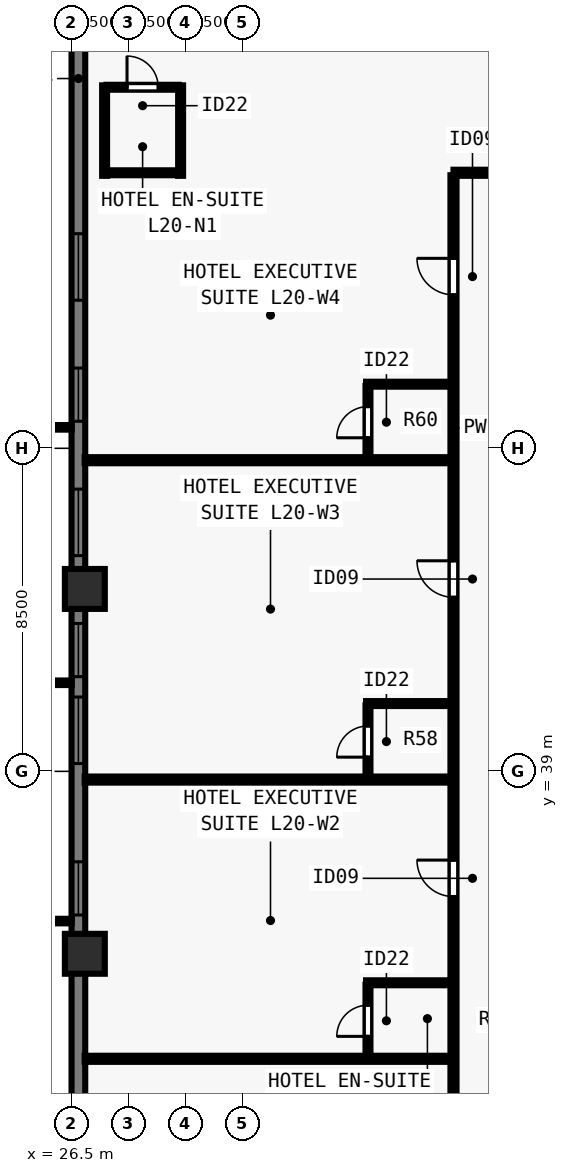
"""IFC4 building model, lengths in metres.
Left out: names, types, materials, properties, quantities, classifications, styles, units other than length and angle.
Written with IfcOpenShell. Run it as: python <this file> out.ifc"""

import sys

from ifc_helpers import new_model, si_unit, direction, frame, frame_2d, origin, origin_2d, place, context, subcontext, project, spatial, rectangle, extrude, element, fill, save


model = new_model("IFC4")
c1 = context("Model", 3, precision=1e-05, world=origin(), true_north=direction((0.0, 1.0)))
c2 = subcontext(c1, "Body", "Model", "MODEL_VIEW")
j1 = project(units=[si_unit("LENGTHUNIT", "METRE"), si_unit("PLANEANGLEUNIT", "RADIAN")], contexts=[c1])
p1 = place(None, origin())
s1 = spatial("IfcSite", under=j1, at=p1, CompositionType="ELEMENT")
p2 = place(p1, origin())
s2 = spatial("IfcBuilding", under=s1, at=p2, CompositionType="ELEMENT")
p3 = place(p2, frame((0.0, 0.0, 76.0)))
s3 = spatial("IfcBuildingStorey", under=s2, at=p3, CompositionType="ELEMENT", Elevation=76.0)
for number, where, z_axis, x_axis in (
    (1, (26.85, 43.8, 0.0), (0.0, 0.0, 1.0), (0.0, 1.0, 0.0)),
    (2, (26.85, 34.2, 0.0), (0.0, 0.0, 1.0), (0.0, 1.0, 0.0)),
):
    element("IfcColumn", number, at=place(p3, frame(where, z_axis=z_axis, x_axis=x_axis)), inside=s3, PredefinedType="COLUMN", context=c2, shape_type="SweptSolid", body=[
        extrude(rectangle(XDim=1.05, YDim=1.05, at=origin_2d()), origin(), (0.0, 0.0, 1.0), 3.5),
    ])
p4 = place(p3, frame((26.68, 16.5, 0.0), z_axis=(0.0, 0.0, 1.0), x_axis=(0.0, 1.0, 0.0)))
e3 = element("IfcWall", 3, at=p4, inside=s3, PredefinedType="SOLIDWALL", context=c2, shape_type="SweptSolid", body=[
    extrude(rectangle(XDim=44.662, YDim=0.36, at=frame_2d((22.331, 0.0))), origin(), (0.0, 0.0, 1.0), 3.28),
])
p5 = place(p4, frame((4.83, 0.0, 0.8)))
e4 = element("IfcOpeningElement", 4, at=p5, cuts=e3, PredefinedType="OPENING", context=c2, shape_type="SweptSolid", body=[
    extrude(rectangle(XDim=1.4, YDim=1.544, at=frame_2d((0.7, 0.772))), frame((0.0, 0.19, 0.0), z_axis=(0.0, -1.0, 0.0), x_axis=(1.0, 0.0, 0.0)), (0.0, 0.0, 1.0), 0.38),
])
p6 = place(p4, frame((8.015, 0.0, 0.8)))
e5 = element("IfcOpeningElement", 5, at=p6, cuts=e3, PredefinedType="OPENING", context=c2, shape_type="SweptSolid", body=[
    extrude(rectangle(XDim=1.75, YDim=1.544, at=frame_2d((0.875, 0.772))), frame((0.0, 0.19, 0.0), z_axis=(0.0, -1.0, 0.0), x_axis=(1.0, 0.0, 0.0)), (0.0, 0.0, 1.0), 0.38),
])
p7 = place(p4, frame((11.551, 0.0, 0.8)))
e6 = element("IfcOpeningElement", 6, at=p7, cuts=e3, PredefinedType="OPENING", context=c2, shape_type="SweptSolid", body=[
    extrude(rectangle(XDim=1.4, YDim=1.544, at=frame_2d((0.7, 0.772))), frame((0.0, 0.19, 0.0), z_axis=(0.0, -1.0, 0.0), x_axis=(1.0, 0.0, 0.0)), (0.0, 0.0, 1.0), 0.38),
])
p8 = place(p4, frame((18.721, 0.0, 0.8)))
e7 = element("IfcOpeningElement", 7, at=p8, cuts=e3, PredefinedType="OPENING", context=c2, shape_type="SweptSolid", body=[
    extrude(rectangle(XDim=1.4, YDim=1.544, at=frame_2d((0.7, 0.772))), frame((0.0, 0.19, 0.0), z_axis=(0.0, -1.0, 0.0), x_axis=(1.0, 0.0, 0.0)), (0.0, 0.0, 1.0), 0.38),
])
p9 = place(p4, frame((22.706, 0.0, 0.8)))
e8 = element("IfcOpeningElement", 8, at=p9, cuts=e3, PredefinedType="OPENING", context=c2, shape_type="SweptSolid", body=[
    extrude(rectangle(XDim=1.75, YDim=1.544, at=frame_2d((0.875, 0.772))), frame((0.0, 0.19, 0.0), z_axis=(0.0, -1.0, 0.0), x_axis=(1.0, 0.0, 0.0)), (0.0, 0.0, 1.0), 0.38),
])
p10 = place(p4, frame((24.991, 0.0, 0.8)))
e9 = element("IfcOpeningElement", 9, at=p10, cuts=e3, PredefinedType="OPENING", context=c2, shape_type="SweptSolid", body=[
    extrude(rectangle(XDim=1.4, YDim=1.544, at=frame_2d((0.7, 0.772))), frame((0.0, 0.19, 0.0), z_axis=(0.0, -1.0, 0.0), x_axis=(1.0, 0.0, 0.0)), (0.0, 0.0, 1.0), 0.38),
])
p11 = place(p4, frame((28.177, 0.0, 0.8)))
e10 = element("IfcOpeningElement", 10, at=p11, cuts=e3, PredefinedType="OPENING", context=c2, shape_type="SweptSolid", body=[
    extrude(rectangle(XDim=1.75, YDim=1.544, at=frame_2d((0.875, 0.772))), frame((0.0, 0.19, 0.0), z_axis=(0.0, -1.0, 0.0), x_axis=(1.0, 0.0, 0.0)), (0.0, 0.0, 1.0), 0.38),
])
p12 = place(p4, frame((31.711, 0.0, 0.8)))
e11 = element("IfcOpeningElement", 11, at=p12, cuts=e3, PredefinedType="OPENING", context=c2, shape_type="SweptSolid", body=[
    extrude(rectangle(XDim=1.4, YDim=1.544, at=frame_2d((0.7, 0.772))), frame((0.0, 0.19, 0.0), z_axis=(0.0, -1.0, 0.0), x_axis=(1.0, 0.0, 0.0)), (0.0, 0.0, 1.0), 0.38),
])
p13 = place(p4, frame((34.897, 0.0, 0.8)))
e12 = element("IfcOpeningElement", 12, at=p13, cuts=e3, PredefinedType="OPENING", context=c2, shape_type="SweptSolid", body=[
    extrude(rectangle(XDim=1.75, YDim=1.544, at=frame_2d((0.875, 0.772))), frame((0.0, 0.19, 0.0), z_axis=(0.0, -1.0, 0.0), x_axis=(1.0, 0.0, 0.0)), (0.0, 0.0, 1.0), 0.38),
])
p14 = place(p3, frame((36.55, 54.75, 0.0), z_axis=(0.0, 0.0, 1.0), x_axis=(1.0, 0.0, 0.0)))
e13 = element("IfcWall", 13, at=p14, inside=s3, PredefinedType="PARTITIONING", context=c2, shape_type="SweptSolid", body=[
    extrude(rectangle(XDim=30.9, YDim=0.16, at=frame_2d((15.45, 0.0))), origin(), (0.0, 0.0, 1.0), 3.28),
])
p15 = place(p14, frame((2.83, 0.0, 0.0)))
e14 = element("IfcOpeningElement", 14, at=p15, cuts=e13, PredefinedType="OPENING", context=c2, shape_type="SweptSolid", body=[
    extrude(rectangle(XDim=0.96, YDim=2.15, at=frame_2d((0.48, 1.075))), frame((0.0, 0.09, 0.0), z_axis=(0.0, -1.0, 0.0), x_axis=(1.0, 0.0, 0.0)), (0.0, 0.0, 1.0), 0.18),
])
p16 = place(p14, frame((15.965, 0.0, 0.0)))
e15 = element("IfcOpeningElement", 15, at=p16, cuts=e13, PredefinedType="OPENING", context=c2, shape_type="SweptSolid", body=[
    extrude(rectangle(XDim=0.96, YDim=2.15, at=frame_2d((0.48, 1.075))), frame((0.0, 0.09, 0.0), z_axis=(0.0, -1.0, 0.0), x_axis=(1.0, 0.0, 0.0)), (0.0, 0.0, 1.0), 0.18),
])
p17 = place(p14, frame((28.105, 0.0, 0.0)))
e16 = element("IfcOpeningElement", 16, at=p17, cuts=e13, PredefinedType="OPENING", context=c2, shape_type="SweptSolid", body=[
    extrude(rectangle(XDim=0.96, YDim=2.15, at=frame_2d((0.48, 1.075))), frame((0.0, 0.09, 0.0), z_axis=(0.0, -1.0, 0.0), x_axis=(1.0, 0.0, 0.0)), (0.0, 0.0, 1.0), 0.18),
])
p18 = place(p3, frame((36.55, 23.315, 0.0), z_axis=(0.0, 0.0, 1.0), x_axis=(0.0, 1.0, 0.0)))
e17 = element("IfcWall", 17, at=p18, inside=s3, PredefinedType="PARTITIONING", context=c2, shape_type="SweptSolid", body=[
    extrude(rectangle(XDim=31.37, YDim=0.16, at=frame_2d((15.685, 0.0))), origin(), (0.0, 0.0, 1.0), 3.28),
])
p19 = place(p18, frame((4.848, 0.0, 0.0)))
e18 = element("IfcOpeningElement", 18, at=p19, cuts=e17, PredefinedType="OPENING", context=c2, shape_type="SweptSolid", body=[
    extrude(rectangle(XDim=0.96, YDim=2.15, at=frame_2d((0.48, 1.075))), frame((0.0, 0.09, 0.0), z_axis=(0.0, -1.0, 0.0), x_axis=(1.0, 0.0, 0.0)), (0.0, 0.0, 1.0), 0.18),
])
p20 = place(p18, frame((12.39, 0.0, 0.0)))
e19 = element("IfcOpeningElement", 19, at=p20, cuts=e17, PredefinedType="OPENING", context=c2, shape_type="SweptSolid", body=[
    extrude(rectangle(XDim=0.96, YDim=2.15, at=frame_2d((0.48, 1.075))), frame((0.0, 0.09, 0.0), z_axis=(0.0, -1.0, 0.0), x_axis=(1.0, 0.0, 0.0)), (0.0, 0.0, 1.0), 0.18),
])
p21 = place(p18, frame((20.265, 0.0, 0.0)))
e20 = element("IfcOpeningElement", 20, at=p21, cuts=e17, PredefinedType="OPENING", context=c2, shape_type="SweptSolid", body=[
    extrude(rectangle(XDim=0.96, YDim=2.15, at=frame_2d((0.48, 1.075))), frame((0.0, 0.09, 0.0), z_axis=(0.0, -1.0, 0.0), x_axis=(1.0, 0.0, 0.0)), (0.0, 0.0, 1.0), 0.18),
])
p22 = place(p18, frame((28.223, 0.0, 0.0)))
e21 = element("IfcOpeningElement", 21, at=p22, cuts=e17, PredefinedType="OPENING", context=c2, shape_type="SweptSolid", body=[
    extrude(rectangle(XDim=0.96, YDim=2.15, at=frame_2d((0.48, 1.075))), frame((0.0, 0.09, 0.0), z_axis=(0.0, -1.0, 0.0), x_axis=(1.0, 0.0, 0.0)), (0.0, 0.0, 1.0), 0.18),
])
for number, where, z_axis, x_axis in (
    (22, (27.37, 54.67, 0.0), (0.0, 0.0, 1.0), (0.0, 1.0, 0.0)),
    (23, (29.37, 54.67, 0.0), (0.0, 0.0, 1.0), (0.0, 1.0, 0.0)),
):
    element("IfcWall", number, at=place(p3, frame(where, z_axis=z_axis, x_axis=x_axis)), inside=s3, PredefinedType="PLUMBINGWALL", context=c2, shape_type="SweptSolid", body=[
        extrude(rectangle(XDim=2.38, YDim=0.13, at=frame_2d((1.19, 0.0))), origin(), (0.0, 0.0, 1.0), 3.28),
    ])
p23 = place(p3, frame((27.42, 57.0, 0.0), z_axis=(0.0, 0.0, 1.0), x_axis=(1.0, 0.0, 0.0)))
e24 = element("IfcWall", 24, at=p23, inside=s3, PredefinedType="PLUMBINGWALL", context=c2, shape_type="SweptSolid", body=[
    extrude(rectangle(XDim=1.9, YDim=0.13, at=frame_2d((0.95, 0.0))), origin(), (0.0, 0.0, 1.0), 3.28),
])
p24 = place(p23, frame((0.54, 0.0, 0.0)))
e25 = element("IfcOpeningElement", 25, at=p24, cuts=e24, PredefinedType="OPENING", context=c2, shape_type="SweptSolid", body=[
    extrude(rectangle(XDim=0.82, YDim=2.1, at=frame_2d((0.41, 1.05))), frame((0.0, 0.075, 0.0), z_axis=(0.0, -1.0, 0.0), x_axis=(1.0, 0.0, 0.0)), (0.0, 0.0, 1.0), 0.15),
])
p25 = place(p3, frame((27.42, 54.75, 0.0), z_axis=(0.0, 0.0, 1.0), x_axis=(1.0, 0.0, 0.0)))
e26 = element("IfcWall", 26, at=p25, inside=s3, PredefinedType="PLUMBINGWALL", context=c2, shape_type="SweptSolid", body=[
    extrude(rectangle(XDim=1.9, YDim=0.13, at=frame_2d((0.95, 0.0))), origin(), (0.0, 0.0, 1.0), 3.28),
])
p26 = place(p3, frame((26.845, 31.437, 0.0), z_axis=(0.0, 0.0, 1.0), x_axis=(1.0, 0.0, 0.0)))
e27 = element("IfcWall", 27, at=p26, inside=s3, PredefinedType="PARTITIONING", context=c2, shape_type="SweptSolid", body=[
    extrude(rectangle(XDim=9.64, YDim=0.16, at=frame_2d((4.82, 0.0))), origin(), (0.0, 0.0, 1.0), 3.28),
])
p27 = place(p3, frame((34.25, 33.437, 0.0), z_axis=(0.0, 0.0, 1.0), x_axis=(1.0, 0.0, 0.0)))
e28 = element("IfcWall", 28, at=p27, inside=s3, PredefinedType="PLUMBINGWALL", context=c2, shape_type="SweptSolid", body=[
    extrude(rectangle(XDim=2.235, YDim=0.13, at=frame_2d((1.118, 0.0))), origin(), (0.0, 0.0, 1.0), 3.28),
])
p28 = place(p3, frame((34.3, 31.502, 0.0), z_axis=(0.0, 0.0, 1.0), x_axis=(0.0, 1.0, 0.0)))
e29 = element("IfcWall", 29, at=p28, inside=s3, PredefinedType="PLUMBINGWALL", context=c2, shape_type="SweptSolid", body=[
    extrude(rectangle(XDim=1.885, YDim=0.13, at=frame_2d((0.942, 0.0))), origin(), (0.0, 0.0, 1.0), 3.28),
])
p29 = place(p28, frame((0.525, 0.0, 0.0)))
e30 = element("IfcOpeningElement", 30, at=p29, cuts=e29, PredefinedType="OPENING", context=c2, shape_type="SweptSolid", body=[
    extrude(rectangle(XDim=0.82, YDim=2.1, at=frame_2d((0.41, 1.05))), frame((0.0, 0.075, 0.0), z_axis=(0.0, -1.0, 0.0), x_axis=(1.0, 0.0, 0.0)), (0.0, 0.0, 1.0), 0.15),
])
p30 = place(p3, frame((26.845, 38.784, 0.0), z_axis=(0.0, 0.0, 1.0), x_axis=(1.0, 0.0, 0.0)))
e31 = element("IfcWall", 31, at=p30, inside=s3, PredefinedType="PARTITIONING", context=c2, shape_type="SweptSolid", body=[
    extrude(rectangle(XDim=9.64, YDim=0.16, at=frame_2d((4.82, 0.0))), origin(), (0.0, 0.0, 1.0), 2.849),
])
p31 = place(p3, frame((34.25, 40.784, 0.0), z_axis=(0.0, 0.0, 1.0), x_axis=(1.0, 0.0, 0.0)))
e32 = element("IfcWall", 32, at=p31, inside=s3, PredefinedType="PLUMBINGWALL", context=c2, shape_type="SweptSolid", body=[
    extrude(rectangle(XDim=2.235, YDim=0.13, at=frame_2d((1.118, 0.0))), origin(), (0.0, 0.0, 1.0), 2.849),
])
p32 = place(p3, frame((34.3, 38.849, 0.0), z_axis=(0.0, 0.0, 1.0), x_axis=(0.0, 1.0, 0.0)))
e33 = element("IfcWall", 33, at=p32, inside=s3, PredefinedType="PLUMBINGWALL", context=c2, shape_type="SweptSolid", body=[
    extrude(rectangle(XDim=1.885, YDim=0.13, at=frame_2d((0.942, 0.0))), origin(), (0.0, 0.0, 1.0), 3.28),
])
p33 = place(p32, frame((0.525, 0.0, 0.0)))
e34 = element("IfcOpeningElement", 34, at=p33, cuts=e33, PredefinedType="OPENING", context=c2, shape_type="SweptSolid", body=[
    extrude(rectangle(XDim=0.82, YDim=2.1, at=frame_2d((0.41, 1.05))), frame((0.0, 0.075, 0.0), z_axis=(0.0, -1.0, 0.0), x_axis=(1.0, 0.0, 0.0)), (0.0, 0.0, 1.0), 0.15),
])
p34 = place(p3, frame((26.845, 47.187, 0.0), z_axis=(0.0, 0.0, 1.0), x_axis=(1.0, 0.0, 0.0)))
e35 = element("IfcWall", 35, at=p34, inside=s3, PredefinedType="PARTITIONING", context=c2, shape_type="SweptSolid", body=[
    extrude(rectangle(XDim=9.64, YDim=0.16, at=frame_2d((4.82, 0.0))), origin(), (0.0, 0.0, 1.0), 3.28),
])
p35 = place(p3, frame((34.25, 49.187, 0.0), z_axis=(0.0, 0.0, 1.0), x_axis=(1.0, 0.0, 0.0)))
e36 = element("IfcWall", 36, at=p35, inside=s3, PredefinedType="PLUMBINGWALL", context=c2, shape_type="SweptSolid", body=[
    extrude(rectangle(XDim=2.235, YDim=0.13, at=frame_2d((1.118, 0.0))), origin(), (0.0, 0.0, 1.0), 3.28),
])
p36 = place(p3, frame((34.3, 47.252, 0.0), z_axis=(0.0, 0.0, 1.0), x_axis=(0.0, 1.0, 0.0)))
e37 = element("IfcWall", 37, at=p36, inside=s3, PredefinedType="PLUMBINGWALL", context=c2, shape_type="SweptSolid", body=[
    extrude(rectangle(XDim=1.885, YDim=0.13, at=frame_2d((0.942, 0.0))), origin(), (0.0, 0.0, 1.0), 3.28),
])
p37 = place(p36, frame((0.525, 0.0, 0.0)))
e38 = element("IfcOpeningElement", 38, at=p37, cuts=e37, PredefinedType="OPENING", context=c2, shape_type="SweptSolid", body=[
    extrude(rectangle(XDim=0.82, YDim=2.1, at=frame_2d((0.41, 1.05))), frame((0.0, 0.075, 0.0), z_axis=(0.0, -1.0, 0.0), x_axis=(1.0, 0.0, 0.0)), (0.0, 0.0, 1.0), 0.15),
])
p38 = place(p8, origin())
e39 = element("IfcWindow", 39, at=p38, inside=s3, PartitioningType="SINGLE_PANEL", PredefinedType="WINDOW", context=c2, shape_type="SweptSolid", body=[
    extrude(rectangle(XDim=1.4, YDim=1.544, at=frame_2d((0.7, 0.772))), frame((0.0, -0.05, 0.0), z_axis=(0.0, -1.0, 0.0), x_axis=(1.0, 0.0, 0.0)), (0.0, 0.0, 1.0), 0.06),
])
fill(e7, e39)
p39 = place(p9, origin())
e40 = element("IfcWindow", 40, at=p39, inside=s3, PartitioningType="SINGLE_PANEL", PredefinedType="WINDOW", context=c2, shape_type="SweptSolid", body=[
    extrude(rectangle(XDim=1.75, YDim=1.544, at=frame_2d((0.875, 0.772))), frame((0.0, -0.05, 0.0), z_axis=(0.0, -1.0, 0.0), x_axis=(1.0, 0.0, 0.0)), (0.0, 0.0, 1.0), 0.06),
])
fill(e8, e40)
p40 = place(p10, origin())
e41 = element("IfcWindow", 41, at=p40, inside=s3, PartitioningType="SINGLE_PANEL", PredefinedType="WINDOW", context=c2, shape_type="SweptSolid", body=[
    extrude(rectangle(XDim=1.4, YDim=1.544, at=frame_2d((0.7, 0.772))), frame((0.0, -0.05, 0.0), z_axis=(0.0, -1.0, 0.0), x_axis=(1.0, 0.0, 0.0)), (0.0, 0.0, 1.0), 0.06),
])
fill(e9, e41)
p41 = place(p11, origin())
e42 = element("IfcWindow", 42, at=p41, inside=s3, PartitioningType="SINGLE_PANEL", PredefinedType="WINDOW", context=c2, shape_type="SweptSolid", body=[
    extrude(rectangle(XDim=1.75, YDim=1.544, at=frame_2d((0.875, 0.772))), frame((0.0, -0.05, 0.0), z_axis=(0.0, -1.0, 0.0), x_axis=(1.0, 0.0, 0.0)), (0.0, 0.0, 1.0), 0.06),
])
fill(e10, e42)
p42 = place(p12, origin())
e43 = element("IfcWindow", 43, at=p42, inside=s3, PartitioningType="SINGLE_PANEL", PredefinedType="WINDOW", context=c2, shape_type="SweptSolid", body=[
    extrude(rectangle(XDim=1.4, YDim=1.544, at=frame_2d((0.7, 0.772))), frame((0.0, -0.05, 0.0), z_axis=(0.0, -1.0, 0.0), x_axis=(1.0, 0.0, 0.0)), (0.0, 0.0, 1.0), 0.06),
])
fill(e11, e43)
p43 = place(p13, origin())
e44 = element("IfcWindow", 44, at=p43, inside=s3, PartitioningType="SINGLE_PANEL", PredefinedType="WINDOW", context=c2, shape_type="SweptSolid", body=[
    extrude(rectangle(XDim=1.75, YDim=1.544, at=frame_2d((0.875, 0.772))), frame((0.0, -0.05, 0.0), z_axis=(0.0, -1.0, 0.0), x_axis=(1.0, 0.0, 0.0)), (0.0, 0.0, 1.0), 0.06),
])
fill(e12, e44)
p44 = place(p24, origin())
e45 = element("IfcDoor", 45, at=p44, inside=s3, OperationType="SINGLE_SWING_LEFT", PredefinedType="DOOR", context=c2, shape_type="SweptSolid", body=[
    extrude(rectangle(XDim=0.82, YDim=2.1, at=frame_2d((0.41, 1.05))), frame((0.0, 0.025, 0.0), z_axis=(0.0, -1.0, 0.0), x_axis=(1.0, 0.0, 0.0)), (0.0, 0.0, 1.0), 0.05),
])
fill(e25, e45)
p45 = place(p29, origin())
e46 = element("IfcDoor", 46, at=p45, inside=s3, OperationType="SINGLE_SWING_LEFT", PredefinedType="DOOR", context=c2, shape_type="SweptSolid", body=[
    extrude(rectangle(XDim=0.82, YDim=2.1, at=frame_2d((0.41, 1.05))), frame((0.0, 0.025, 0.0), z_axis=(0.0, -1.0, 0.0), x_axis=(1.0, 0.0, 0.0)), (0.0, 0.0, 1.0), 0.05),
])
fill(e30, e46)
p46 = place(p20, origin())
e47 = element("IfcDoor", 47, at=p46, inside=s3, OperationType="SINGLE_SWING_RIGHT", PredefinedType="DOOR", context=c2, shape_type="SweptSolid", body=[
    extrude(rectangle(XDim=0.96, YDim=2.15, at=frame_2d((0.48, 1.075))), frame((0.0, 0.025, 0.0), z_axis=(0.0, -1.0, 0.0), x_axis=(1.0, 0.0, 0.0)), (0.0, 0.0, 1.0), 0.05),
])
fill(e19, e47)
p47 = place(p33, origin())
e48 = element("IfcDoor", 48, at=p47, inside=s3, OperationType="SINGLE_SWING_LEFT", PredefinedType="DOOR", context=c2, shape_type="SweptSolid", body=[
    extrude(rectangle(XDim=0.82, YDim=2.1, at=frame_2d((0.41, 1.05))), frame((0.0, 0.025, 0.0), z_axis=(0.0, -1.0, 0.0), x_axis=(1.0, 0.0, 0.0)), (0.0, 0.0, 1.0), 0.05),
])
fill(e34, e48)
p48 = place(p21, origin())
e49 = element("IfcDoor", 49, at=p48, inside=s3, OperationType="SINGLE_SWING_RIGHT", PredefinedType="DOOR", context=c2, shape_type="SweptSolid", body=[
    extrude(rectangle(XDim=0.96, YDim=2.15, at=frame_2d((0.48, 1.075))), frame((0.0, 0.025, 0.0), z_axis=(0.0, -1.0, 0.0), x_axis=(1.0, 0.0, 0.0)), (0.0, 0.0, 1.0), 0.05),
])
fill(e20, e49)
p49 = place(p37, origin())
e50 = element("IfcDoor", 50, at=p49, inside=s3, OperationType="SINGLE_SWING_LEFT", PredefinedType="DOOR", context=c2, shape_type="SweptSolid", body=[
    extrude(rectangle(XDim=0.82, YDim=2.1, at=frame_2d((0.41, 1.05))), frame((0.0, 0.025, 0.0), z_axis=(0.0, -1.0, 0.0), x_axis=(1.0, 0.0, 0.0)), (0.0, 0.0, 1.0), 0.05),
])
fill(e38, e50)
p50 = place(p22, origin())
e51 = element("IfcDoor", 51, at=p50, inside=s3, OperationType="SINGLE_SWING_RIGHT", PredefinedType="DOOR", context=c2, shape_type="SweptSolid", body=[
    extrude(rectangle(XDim=0.96, YDim=2.15, at=frame_2d((0.48, 1.075))), frame((0.0, 0.025, 0.0), z_axis=(0.0, -1.0, 0.0), x_axis=(1.0, 0.0, 0.0)), (0.0, 0.0, 1.0), 0.05),
])
fill(e21, e51)
save(model, sys.argv[1])
